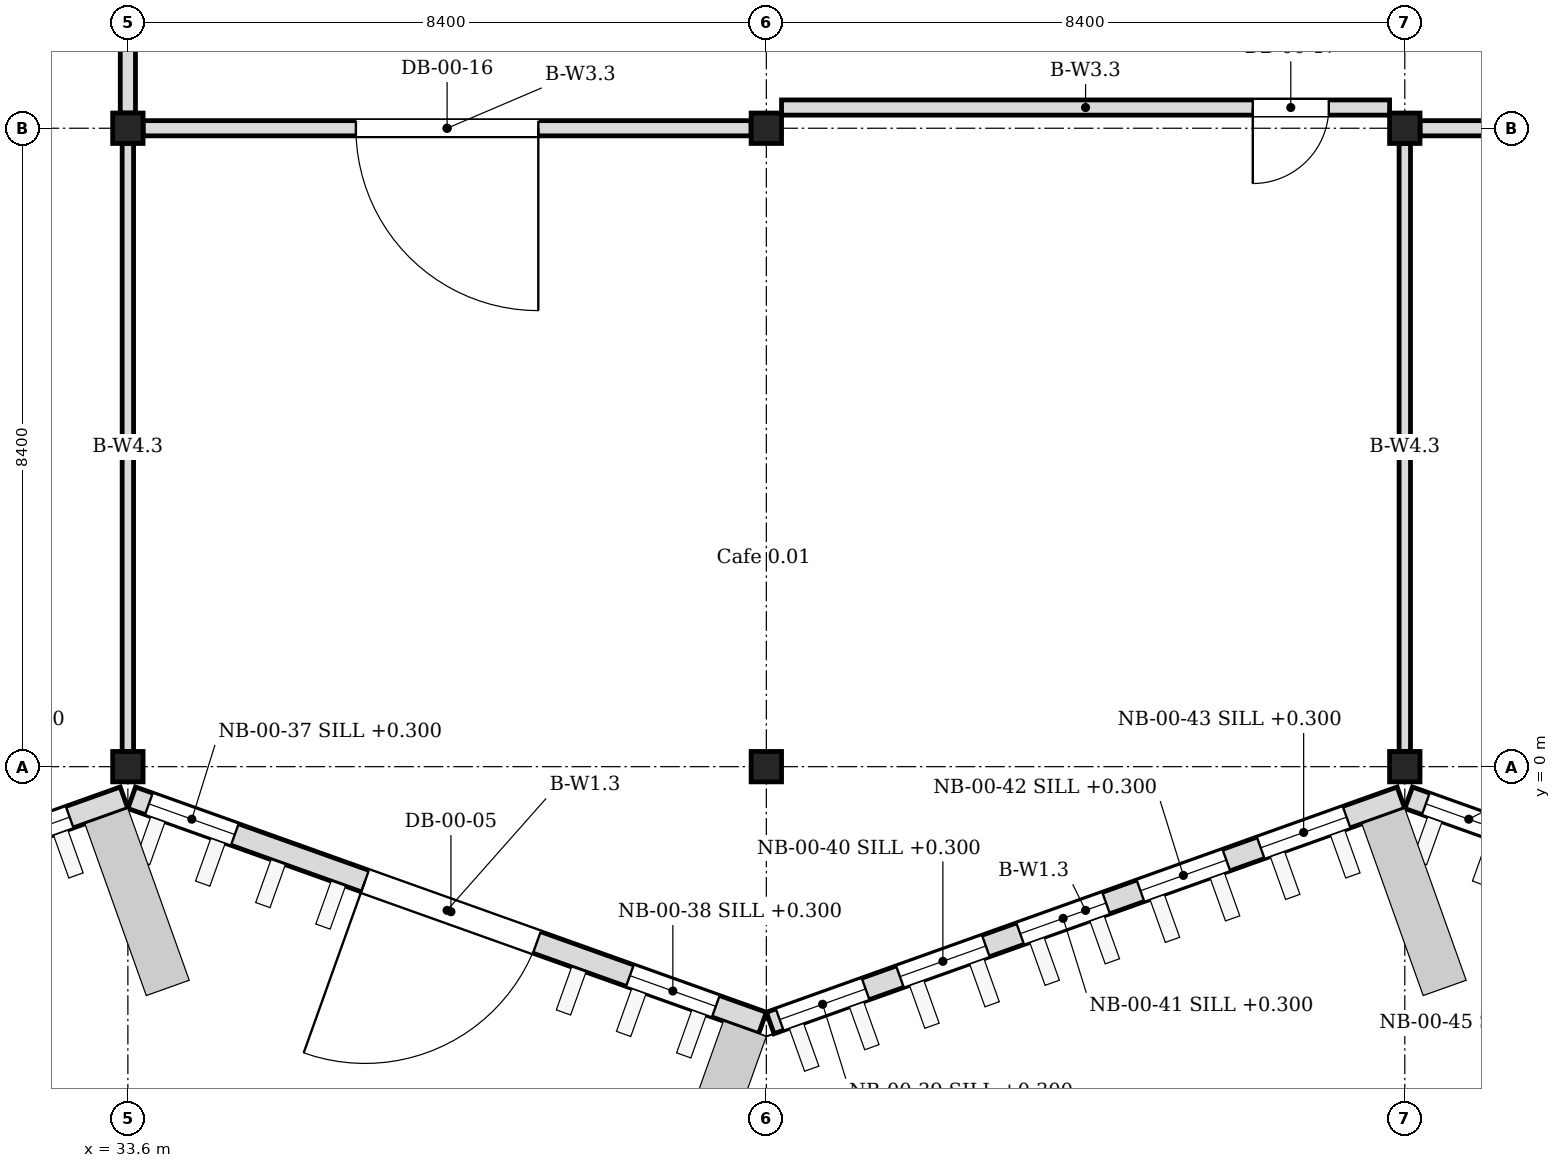
"""IFC4 building model, lengths in metres.
Left out: names, types, materials, properties, quantities, classifications, styles, units other than length and angle.
Written with IfcOpenShell. Run it as: python <this file> out.ifc"""

import sys

from ifc_helpers import new_model, si_unit, direction, frame, frame_2d, origin, origin_2d, place, context, subcontext, project, spatial, rectangle, i_section, extrude, element, fill, save


model = new_model("IFC4")
c1 = context("Model", 3, precision=1e-05, world=origin(), true_north=direction((0.0, 1.0)))
c2 = subcontext(c1, "Body", "Model", "MODEL_VIEW")
j1 = project(units=[si_unit("LENGTHUNIT", "METRE"), si_unit("PLANEANGLEUNIT", "RADIAN")], contexts=[c1])
p1 = place(None, origin())
s1 = spatial("IfcSite", under=j1, at=p1, CompositionType="ELEMENT")
p2 = place(p1, origin())
s2 = spatial("IfcBuilding", under=s1, at=p2, CompositionType="ELEMENT")
p3 = place(p2, origin())
s3 = spatial("IfcBuildingStorey", under=s2, at=p3, CompositionType="ELEMENT", Elevation=0.0)
for number, where, z_axis, x_axis in (
    (1, (33.6, 0.0, 0.0), (0.0, 0.0, 1.0), (1.0, 0.0, 0.0)),
    (2, (33.6, 8.4, 0.0), (0.0, 0.0, 1.0), (1.0, 0.0, 0.0)),
    (3, (42.0, 0.0, 0.0), (0.0, 0.0, 1.0), (1.0, 0.0, 0.0)),
    (4, (42.0, 8.4, 0.0), (0.0, 0.0, 1.0), (1.0, 0.0, 0.0)),
    (5, (50.4, 0.0, 0.0), (0.0, 0.0, 1.0), (1.0, 0.0, 0.0)),
    (6, (50.4, 8.4, 0.0), (0.0, 0.0, 1.0), (1.0, 0.0, 0.0)),
):
    element("IfcColumn", number, at=place(p3, frame(where, z_axis=z_axis, x_axis=x_axis)), inside=s3, PredefinedType="COLUMN", context=c2, shape_type="SweptSolid", body=[
        extrude(i_section(OverallWidth=0.4, OverallDepth=0.4, WebThickness=0.013, FlangeThickness=0.021, FilletRadius=0.022, at=origin_2d()), origin(), (0.0, 0.0, 1.0), 6.0),
    ])
p4 = place(p3, frame((25.251, -3.372, 0.0), z_axis=(0.0, 0.0, 1.0), x_axis=(0.941744418946, 0.336329376334, 0.0)))
e7 = element("IfcWall", 7, at=p4, inside=s3, PredefinedType="SOLIDWALL", context=c2, shape_type="SweptSolid", body=[
    extrude(rectangle(XDim=8.812, YDim=0.3, at=frame_2d((4.406, 0.0))), origin(), (0.0, 0.0, 1.0), 5.85),
])
p5 = place(p4, frame((0.132, 0.0, 0.3)))
e8 = element("IfcOpeningElement", 8, at=p5, cuts=e7, PredefinedType="OPENING", context=c2, shape_type="SweptSolid", body=[
    extrude(rectangle(XDim=1.2, YDim=4.2, at=frame_2d((0.6, 2.1))), frame((0.0, 0.16, 0.0), z_axis=(0.0, -1.0, 0.0), x_axis=(1.0, 0.0, 0.0)), (0.0, 0.0, 1.0), 0.32),
])
p6 = place(p4, frame((1.812, 0.0, 0.3)))
e9 = element("IfcOpeningElement", 9, at=p6, cuts=e7, PredefinedType="OPENING", context=c2, shape_type="SweptSolid", body=[
    extrude(rectangle(XDim=1.2, YDim=4.2, at=frame_2d((0.6, 2.1))), frame((0.0, 0.16, 0.0), z_axis=(0.0, -1.0, 0.0), x_axis=(1.0, 0.0, 0.0)), (0.0, 0.0, 1.0), 0.32),
])
p7 = place(p4, frame((3.492, 0.0, 0.3)))
e10 = element("IfcOpeningElement", 10, at=p7, cuts=e7, PredefinedType="OPENING", context=c2, shape_type="SweptSolid", body=[
    extrude(rectangle(XDim=1.2, YDim=4.2, at=frame_2d((0.6, 2.1))), frame((0.0, 0.16, 0.0), z_axis=(0.0, -1.0, 0.0), x_axis=(1.0, 0.0, 0.0)), (0.0, 0.0, 1.0), 0.32),
])
p8 = place(p4, frame((5.172, 0.0, 0.3)))
e11 = element("IfcOpeningElement", 11, at=p8, cuts=e7, PredefinedType="OPENING", context=c2, shape_type="SweptSolid", body=[
    extrude(rectangle(XDim=1.2, YDim=4.2, at=frame_2d((0.6, 2.1))), frame((0.0, 0.16, 0.0), z_axis=(0.0, -1.0, 0.0), x_axis=(1.0, 0.0, 0.0)), (0.0, 0.0, 1.0), 0.32),
])
p9 = place(p4, frame((6.852, 0.0, 0.3)))
e12 = element("IfcOpeningElement", 12, at=p9, cuts=e7, PredefinedType="OPENING", context=c2, shape_type="SweptSolid", body=[
    extrude(rectangle(XDim=1.2, YDim=4.2, at=frame_2d((0.6, 2.1))), frame((0.0, 0.16, 0.0), z_axis=(0.0, -1.0, 0.0), x_axis=(1.0, 0.0, 0.0)), (0.0, 0.0, 1.0), 0.32),
])
p10 = place(p3, frame((33.65, -0.409, 0.0), z_axis=(0.0, 0.0, 1.0), x_axis=(0.941736270411, -0.336352191894, 0.0)))
e13 = element("IfcWall", 13, at=p10, inside=s3, PredefinedType="SOLIDWALL", context=c2, shape_type="SweptSolid", body=[
    extrude(rectangle(XDim=8.812, YDim=0.3, at=frame_2d((4.406, 0.0))), origin(), (0.0, 0.0, 1.0), 5.85),
])
p11 = place(p10, frame((3.26, 0.0, 0.0)))
e14 = element("IfcOpeningElement", 14, at=p11, cuts=e13, PredefinedType="OPENING", context=c2, shape_type="SweptSolid", body=[
    extrude(rectangle(XDim=2.4, YDim=2.6, at=frame_2d((1.2, 1.3))), frame((0.0, 0.16, 0.0), z_axis=(0.0, -1.0, 0.0), x_axis=(1.0, 0.0, 0.0)), (0.0, 0.0, 1.0), 0.32),
])
p12 = place(p10, frame((0.24, 0.0, 0.3)))
e15 = element("IfcOpeningElement", 15, at=p12, cuts=e13, PredefinedType="OPENING", context=c2, shape_type="SweptSolid", body=[
    extrude(rectangle(XDim=1.2, YDim=4.2, at=frame_2d((0.6, 2.1))), frame((0.0, 0.16, 0.0), z_axis=(0.0, -1.0, 0.0), x_axis=(1.0, 0.0, 0.0)), (0.0, 0.0, 1.0), 0.32),
])
p13 = place(p10, frame((6.96, 0.0, 0.3)))
e16 = element("IfcOpeningElement", 16, at=p13, cuts=e13, PredefinedType="OPENING", context=c2, shape_type="SweptSolid", body=[
    extrude(rectangle(XDim=1.2, YDim=4.2, at=frame_2d((0.6, 2.1))), frame((0.0, 0.16, 0.0), z_axis=(0.0, -1.0, 0.0), x_axis=(1.0, 0.0, 0.0)), (0.0, 0.0, 1.0), 0.32),
])
p14 = place(p3, frame((42.051, -3.373, 0.0), z_axis=(0.0, 0.0, 1.0), x_axis=(0.941736270411, 0.336352191894, 0.0)))
e17 = element("IfcWall", 17, at=p14, inside=s3, PredefinedType="SOLIDWALL", context=c2, shape_type="SweptSolid", body=[
    extrude(rectangle(XDim=8.812, YDim=0.3, at=frame_2d((4.406, 0.0))), origin(), (0.0, 0.0, 1.0), 5.85),
])
p15 = place(p14, frame((0.133, 0.0, 0.3)))
e18 = element("IfcOpeningElement", 18, at=p15, cuts=e17, PredefinedType="OPENING", context=c2, shape_type="SweptSolid", body=[
    extrude(rectangle(XDim=1.2, YDim=4.2, at=frame_2d((0.6, 2.1))), frame((0.0, 0.16, 0.0), z_axis=(0.0, -1.0, 0.0), x_axis=(1.0, 0.0, 0.0)), (0.0, 0.0, 1.0), 0.32),
])
p16 = place(p14, frame((1.813, 0.0, 0.3)))
e19 = element("IfcOpeningElement", 19, at=p16, cuts=e17, PredefinedType="OPENING", context=c2, shape_type="SweptSolid", body=[
    extrude(rectangle(XDim=1.2, YDim=4.2, at=frame_2d((0.6, 2.1))), frame((0.0, 0.16, 0.0), z_axis=(0.0, -1.0, 0.0), x_axis=(1.0, 0.0, 0.0)), (0.0, 0.0, 1.0), 0.32),
])
p17 = place(p14, frame((3.493, 0.0, 0.3)))
e20 = element("IfcOpeningElement", 20, at=p17, cuts=e17, PredefinedType="OPENING", context=c2, shape_type="SweptSolid", body=[
    extrude(rectangle(XDim=1.2, YDim=4.2, at=frame_2d((0.6, 2.1))), frame((0.0, 0.16, 0.0), z_axis=(0.0, -1.0, 0.0), x_axis=(1.0, 0.0, 0.0)), (0.0, 0.0, 1.0), 0.32),
])
p18 = place(p14, frame((5.173, 0.0, 0.3)))
e21 = element("IfcOpeningElement", 21, at=p18, cuts=e17, PredefinedType="OPENING", context=c2, shape_type="SweptSolid", body=[
    extrude(rectangle(XDim=1.2, YDim=4.2, at=frame_2d((0.6, 2.1))), frame((0.0, 0.16, 0.0), z_axis=(0.0, -1.0, 0.0), x_axis=(1.0, 0.0, 0.0)), (0.0, 0.0, 1.0), 0.32),
])
p19 = place(p14, frame((6.853, 0.0, 0.3)))
e22 = element("IfcOpeningElement", 22, at=p19, cuts=e17, PredefinedType="OPENING", context=c2, shape_type="SweptSolid", body=[
    extrude(rectangle(XDim=1.2, YDim=4.2, at=frame_2d((0.6, 2.1))), frame((0.0, 0.16, 0.0), z_axis=(0.0, -1.0, 0.0), x_axis=(1.0, 0.0, 0.0)), (0.0, 0.0, 1.0), 0.32),
])
p20 = place(p3, frame((50.45, -0.409, 0.0), z_axis=(0.0, 0.0, 1.0), x_axis=(0.941744418946, -0.336329376334, 0.0)))
e23 = element("IfcWall", 23, at=p20, inside=s3, PredefinedType="SOLIDWALL", context=c2, shape_type="SweptSolid", body=[
    extrude(rectangle(XDim=8.812, YDim=0.3, at=frame_2d((4.406, 0.0))), origin(), (0.0, 0.0, 1.0), 5.85),
])
p21 = place(p20, frame((0.24, 0.0, 0.3)))
e24 = element("IfcOpeningElement", 24, at=p21, cuts=e23, PredefinedType="OPENING", context=c2, shape_type="SweptSolid", body=[
    extrude(rectangle(XDim=1.2, YDim=4.2, at=frame_2d((0.6, 2.1))), frame((0.0, 0.16, 0.0), z_axis=(0.0, -1.0, 0.0), x_axis=(1.0, 0.0, 0.0)), (0.0, 0.0, 1.0), 0.32),
])
p22 = place(p20, frame((1.92, 0.0, 0.3)))
e25 = element("IfcOpeningElement", 25, at=p22, cuts=e23, PredefinedType="OPENING", context=c2, shape_type="SweptSolid", body=[
    extrude(rectangle(XDim=1.2, YDim=4.2, at=frame_2d((0.6, 2.1))), frame((0.0, 0.16, 0.0), z_axis=(0.0, -1.0, 0.0), x_axis=(1.0, 0.0, 0.0)), (0.0, 0.0, 1.0), 0.32),
])
p23 = place(p20, frame((3.6, 0.0, 0.3)))
e26 = element("IfcOpeningElement", 26, at=p23, cuts=e23, PredefinedType="OPENING", context=c2, shape_type="SweptSolid", body=[
    extrude(rectangle(XDim=1.2, YDim=4.2, at=frame_2d((0.6, 2.1))), frame((0.0, 0.16, 0.0), z_axis=(0.0, -1.0, 0.0), x_axis=(1.0, 0.0, 0.0)), (0.0, 0.0, 1.0), 0.32),
])
p24 = place(p20, frame((5.28, 0.0, 0.3)))
e27 = element("IfcOpeningElement", 27, at=p24, cuts=e23, PredefinedType="OPENING", context=c2, shape_type="SweptSolid", body=[
    extrude(rectangle(XDim=1.2, YDim=4.2, at=frame_2d((0.6, 2.1))), frame((0.0, 0.16, 0.0), z_axis=(0.0, -1.0, 0.0), x_axis=(1.0, 0.0, 0.0)), (0.0, 0.0, 1.0), 0.32),
])
p25 = place(p20, frame((6.96, 0.0, 0.3)))
e28 = element("IfcOpeningElement", 28, at=p25, cuts=e23, PredefinedType="OPENING", context=c2, shape_type="SweptSolid", body=[
    extrude(rectangle(XDim=1.2, YDim=4.2, at=frame_2d((0.6, 2.1))), frame((0.0, 0.16, 0.0), z_axis=(0.0, -1.0, 0.0), x_axis=(1.0, 0.0, 0.0)), (0.0, 0.0, 1.0), 0.32),
])
p26 = place(p3, frame((33.8, 8.4, 0.0), z_axis=(0.0, 0.0, 1.0), x_axis=(1.0, 0.0, 0.0)))
e29 = element("IfcWall", 29, at=p26, inside=s3, PredefinedType="PARTITIONING", context=c2, shape_type="SweptSolid", body=[
    extrude(rectangle(XDim=8.0, YDim=0.2, at=frame_2d((4.0, 0.0))), origin(), (0.0, 0.0, 1.0), 5.05),
])
p27 = place(p26, frame((2.8, 0.0, 0.0)))
e30 = element("IfcOpeningElement", 30, at=p27, cuts=e29, PredefinedType="OPENING", context=c2, shape_type="SweptSolid", body=[
    extrude(rectangle(XDim=2.4, YDim=2.2, at=frame_2d((1.2, 1.1))), frame((0.0, 0.11, 0.0), z_axis=(0.0, -1.0, 0.0), x_axis=(1.0, 0.0, 0.0)), (0.0, 0.0, 1.0), 0.22),
])
p28 = place(p3, frame((42.2, 8.673, 0.0), z_axis=(0.0, 0.0, 1.0), x_axis=(1.0, 0.0, 0.0)))
e31 = element("IfcWall", 31, at=p28, inside=s3, PredefinedType="PARTITIONING", context=c2, shape_type="SweptSolid", body=[
    extrude(rectangle(XDim=8.0, YDim=0.2, at=frame_2d((4.0, 0.0))), origin(), (0.0, 0.0, 1.0), 5.05),
])
p29 = place(p28, frame((6.2, 0.0, 0.0)))
e32 = element("IfcOpeningElement", 32, at=p29, cuts=e31, PredefinedType="OPENING", context=c2, shape_type="SweptSolid", body=[
    extrude(rectangle(XDim=1.0, YDim=2.1, at=frame_2d((0.5, 1.05))), frame((0.0, 0.11, 0.0), z_axis=(0.0, -1.0, 0.0), x_axis=(1.0, 0.0, 0.0)), (0.0, 0.0, 1.0), 0.22),
])
p30 = place(p3, frame((50.6, 8.4, 0.0), z_axis=(0.0, 0.0, 1.0), x_axis=(1.0, 0.0, 0.0)))
e33 = element("IfcWall", 33, at=p30, inside=s3, PredefinedType="PARTITIONING", context=c2, shape_type="SweptSolid", body=[
    extrude(rectangle(XDim=8.0, YDim=0.2, at=frame_2d((4.0, 0.0))), origin(), (0.0, 0.0, 1.0), 5.05),
])
p31 = place(p30, frame((3.5, 0.0, 0.0)))
e34 = element("IfcOpeningElement", 34, at=p31, cuts=e33, PredefinedType="OPENING", context=c2, shape_type="SweptSolid", body=[
    extrude(rectangle(XDim=1.0, YDim=2.1, at=frame_2d((0.5, 1.05))), frame((0.0, 0.11, 0.0), z_axis=(0.0, -1.0, 0.0), x_axis=(1.0, 0.0, 0.0)), (0.0, 0.0, 1.0), 0.22),
])
p32 = place(p3, frame((33.6, 0.2, 0.0), z_axis=(0.0, 0.0, 1.0), x_axis=(0.0, 1.0, 0.0)))
e35 = element("IfcWall", 35, at=p32, inside=s3, PredefinedType="PARTITIONING", context=c2, shape_type="SweptSolid", body=[
    extrude(rectangle(XDim=8.0, YDim=0.15, at=frame_2d((4.0, 0.0))), origin(), (0.0, 0.0, 1.0), 5.05),
])
p33 = place(p3, frame((33.6, 8.6, 0.0), z_axis=(0.0, 0.0, 1.0), x_axis=(0.0, 1.0, 0.0)))
e36 = element("IfcWall", 36, at=p33, inside=s3, PredefinedType="PARTITIONING", context=c2, shape_type="SweptSolid", body=[
    extrude(rectangle(XDim=8.0, YDim=0.2, at=frame_2d((4.0, 0.0))), origin(), (0.0, 0.0, 1.0), 5.05),
])
p34 = place(p33, frame((2.8, 0.0, 0.0)))
e37 = element("IfcOpeningElement", 37, at=p34, cuts=e36, PredefinedType="OPENING", context=c2, shape_type="SweptSolid", body=[
    extrude(rectangle(XDim=2.4, YDim=2.2, at=frame_2d((1.2, 1.1))), frame((0.0, 0.11, 0.0), z_axis=(0.0, -1.0, 0.0), x_axis=(1.0, 0.0, 0.0)), (0.0, 0.0, 1.0), 0.22),
])
p35 = place(p3, frame((50.4, 0.2, 0.0), z_axis=(0.0, 0.0, 1.0), x_axis=(0.0, 1.0, 0.0)))
e38 = element("IfcWall", 38, at=p35, inside=s3, PredefinedType="PARTITIONING", context=c2, shape_type="SweptSolid", body=[
    extrude(rectangle(XDim=8.0, YDim=0.15, at=frame_2d((4.0, 0.0))), origin(), (0.0, 0.0, 1.0), 5.05),
])
p36 = place(p9, origin())
e39 = element("IfcWindow", 39, at=p36, inside=s3, PartitioningType="TRIPLE_PANEL_VERTICAL", PredefinedType="WINDOW", context=c2, shape_type="SweptSolid", body=[
    extrude(rectangle(XDim=1.2, YDim=4.2, at=frame_2d((0.6, 2.1))), frame((0.0, 0.03, 0.0), z_axis=(0.0, -1.0, 0.0), x_axis=(1.0, 0.0, 0.0)), (0.0, 0.0, 1.0), 0.06),
])
fill(e12, e39)
p37 = place(p11, origin())
e40 = element("IfcDoor", 40, at=p37, inside=s3, OperationType="DOUBLE_DOOR_SINGLE_SWING", PredefinedType="DOOR", context=c2, shape_type="SweptSolid", body=[
    extrude(rectangle(XDim=2.4, YDim=2.6, at=frame_2d((1.2, 1.3))), frame((0.0, 0.025, 0.0), z_axis=(0.0, -1.0, 0.0), x_axis=(1.0, 0.0, 0.0)), (0.0, 0.0, 1.0), 0.05),
])
fill(e14, e40)
p38 = place(p12, origin())
e41 = element("IfcWindow", 41, at=p38, inside=s3, PartitioningType="TRIPLE_PANEL_VERTICAL", PredefinedType="WINDOW", context=c2, shape_type="SweptSolid", body=[
    extrude(rectangle(XDim=1.2, YDim=4.2, at=frame_2d((0.6, 2.1))), frame((0.0, 0.03, 0.0), z_axis=(0.0, -1.0, 0.0), x_axis=(1.0, 0.0, 0.0)), (0.0, 0.0, 1.0), 0.06),
])
fill(e15, e41)
p39 = place(p13, origin())
e42 = element("IfcWindow", 42, at=p39, inside=s3, PartitioningType="TRIPLE_PANEL_VERTICAL", PredefinedType="WINDOW", context=c2, shape_type="SweptSolid", body=[
    extrude(rectangle(XDim=1.2, YDim=4.2, at=frame_2d((0.6, 2.1))), frame((0.0, 0.03, 0.0), z_axis=(0.0, -1.0, 0.0), x_axis=(1.0, 0.0, 0.0)), (0.0, 0.0, 1.0), 0.06),
])
fill(e16, e42)
p40 = place(p15, origin())
e43 = element("IfcWindow", 43, at=p40, inside=s3, PartitioningType="TRIPLE_PANEL_VERTICAL", PredefinedType="WINDOW", context=c2, shape_type="SweptSolid", body=[
    extrude(rectangle(XDim=1.2, YDim=4.2, at=frame_2d((0.6, 2.1))), frame((0.0, 0.03, 0.0), z_axis=(0.0, -1.0, 0.0), x_axis=(1.0, 0.0, 0.0)), (0.0, 0.0, 1.0), 0.06),
])
fill(e18, e43)
p41 = place(p16, origin())
e44 = element("IfcWindow", 44, at=p41, inside=s3, PartitioningType="TRIPLE_PANEL_VERTICAL", PredefinedType="WINDOW", context=c2, shape_type="SweptSolid", body=[
    extrude(rectangle(XDim=1.2, YDim=4.2, at=frame_2d((0.6, 2.1))), frame((0.0, 0.03, 0.0), z_axis=(0.0, -1.0, 0.0), x_axis=(1.0, 0.0, 0.0)), (0.0, 0.0, 1.0), 0.06),
])
fill(e19, e44)
p42 = place(p17, origin())
e45 = element("IfcWindow", 45, at=p42, inside=s3, PartitioningType="TRIPLE_PANEL_VERTICAL", PredefinedType="WINDOW", context=c2, shape_type="SweptSolid", body=[
    extrude(rectangle(XDim=1.2, YDim=4.2, at=frame_2d((0.6, 2.1))), frame((0.0, 0.03, 0.0), z_axis=(0.0, -1.0, 0.0), x_axis=(1.0, 0.0, 0.0)), (0.0, 0.0, 1.0), 0.06),
])
fill(e20, e45)
p43 = place(p18, origin())
e46 = element("IfcWindow", 46, at=p43, inside=s3, PartitioningType="TRIPLE_PANEL_VERTICAL", PredefinedType="WINDOW", context=c2, shape_type="SweptSolid", body=[
    extrude(rectangle(XDim=1.2, YDim=4.2, at=frame_2d((0.6, 2.1))), frame((0.0, 0.03, 0.0), z_axis=(0.0, -1.0, 0.0), x_axis=(1.0, 0.0, 0.0)), (0.0, 0.0, 1.0), 0.06),
])
fill(e21, e46)
p44 = place(p19, origin())
e47 = element("IfcWindow", 47, at=p44, inside=s3, PartitioningType="TRIPLE_PANEL_VERTICAL", PredefinedType="WINDOW", context=c2, shape_type="SweptSolid", body=[
    extrude(rectangle(XDim=1.2, YDim=4.2, at=frame_2d((0.6, 2.1))), frame((0.0, 0.03, 0.0), z_axis=(0.0, -1.0, 0.0), x_axis=(1.0, 0.0, 0.0)), (0.0, 0.0, 1.0), 0.06),
])
fill(e22, e47)
p45 = place(p21, origin())
e48 = element("IfcWindow", 48, at=p45, inside=s3, PartitioningType="TRIPLE_PANEL_VERTICAL", PredefinedType="WINDOW", context=c2, shape_type="SweptSolid", body=[
    extrude(rectangle(XDim=1.2, YDim=4.2, at=frame_2d((0.6, 2.1))), frame((0.0, 0.03, 0.0), z_axis=(0.0, -1.0, 0.0), x_axis=(1.0, 0.0, 0.0)), (0.0, 0.0, 1.0), 0.06),
])
fill(e24, e48)
p46 = place(p27, origin())
e49 = element("IfcDoor", 49, at=p46, inside=s3, OperationType="DOUBLE_DOOR_SINGLE_SWING", PredefinedType="DOOR", context=c2, shape_type="SweptSolid", body=[
    extrude(rectangle(XDim=2.4, YDim=2.2, at=frame_2d((1.2, 1.1))), frame((0.0, 0.025, 0.0), z_axis=(0.0, -1.0, 0.0), x_axis=(1.0, 0.0, 0.0)), (0.0, 0.0, 1.0), 0.05),
])
fill(e30, e49)
p47 = place(p29, origin())
e50 = element("IfcDoor", 50, at=p47, inside=s3, OperationType="SINGLE_SWING_LEFT", PredefinedType="DOOR", context=c2, shape_type="SweptSolid", body=[
    extrude(rectangle(XDim=1.0, YDim=2.1, at=frame_2d((0.5, 1.05))), frame((0.0, 0.025, 0.0), z_axis=(0.0, -1.0, 0.0), x_axis=(1.0, 0.0, 0.0)), (0.0, 0.0, 1.0), 0.05),
])
fill(e32, e50)
save(model, sys.argv[1])
